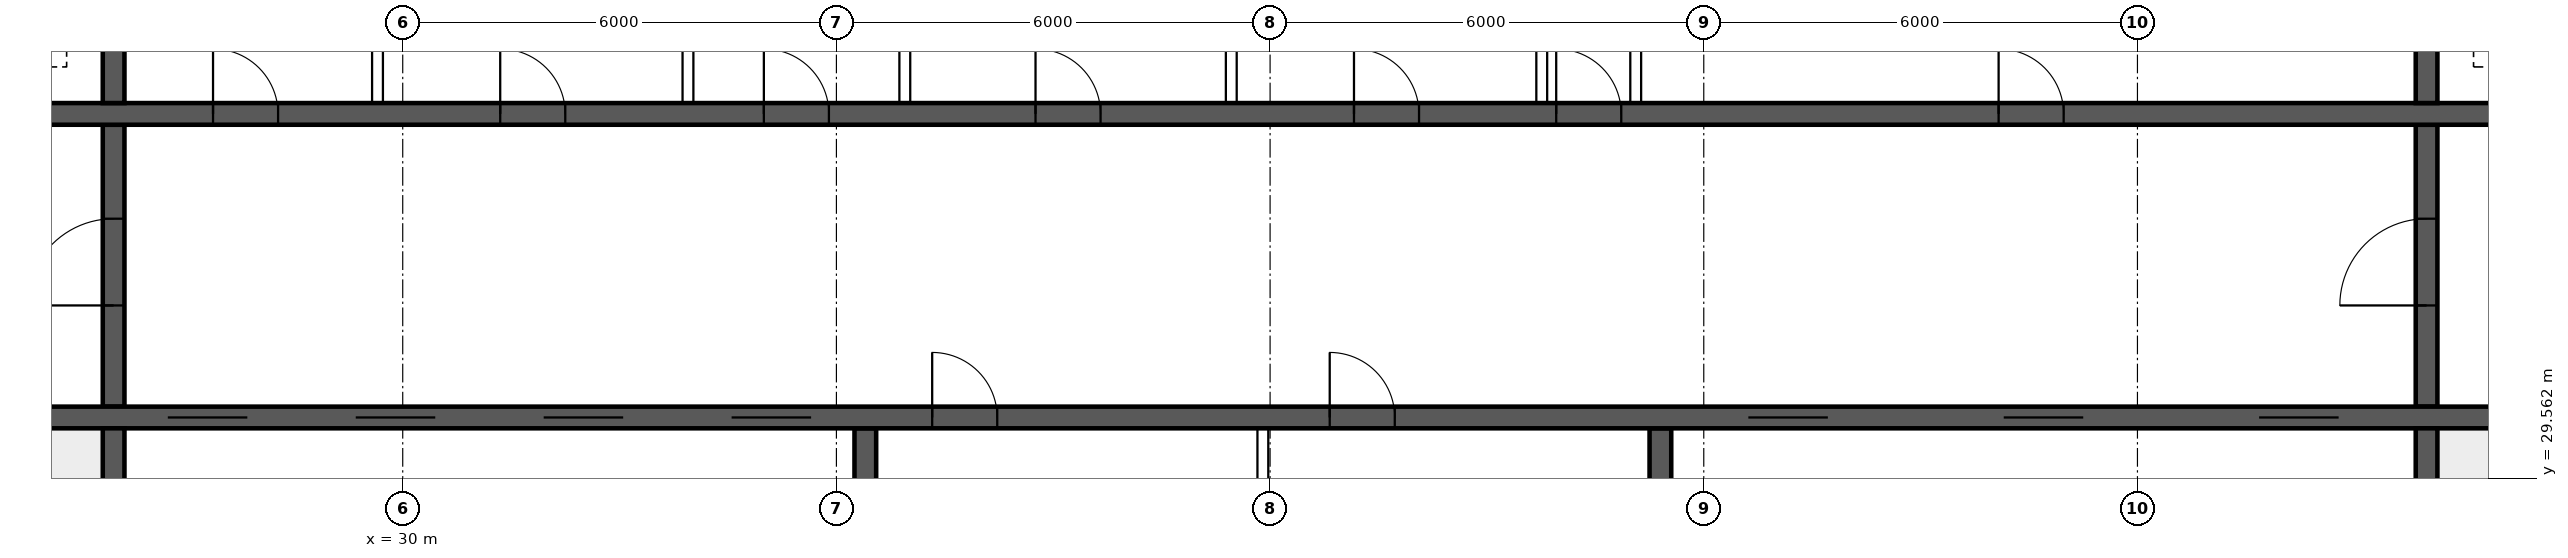
"""IFC4 building model, lengths in metres.
Left out: names, types, materials, properties, quantities, classifications, styles, units other than length and angle.
Written with IfcOpenShell. Run it as: python <this file> out.ifc"""

import sys

from ifc_helpers import new_model, si_unit, direction, frame, frame_2d, origin, place, context, subcontext, project, spatial, rectangle, extrude, element, fill, save


model = new_model("IFC4")
c1 = context("Model", 3, precision=1e-05, world=origin(), true_north=direction((0.0, 1.0)))
c2 = subcontext(c1, "Body", "Model", "MODEL_VIEW")
j1 = project(units=[si_unit("LENGTHUNIT", "METRE"), si_unit("PLANEANGLEUNIT", "RADIAN")], contexts=[c1])
p1 = place(None, origin())
s1 = spatial("IfcSite", under=j1, at=p1, CompositionType="ELEMENT")
p2 = place(p1, origin())
s2 = spatial("IfcBuilding", under=s1, at=p2, CompositionType="ELEMENT")
p3 = place(p2, frame((0.0, 0.0, 231.55)))
s3 = spatial("IfcBuildingStorey", under=s2, at=p3, CompositionType="ELEMENT", Elevation=231.55)
p4 = place(p3, frame((18.35, 30.4, 0.0), z_axis=(0.0, 0.0, 1.0), x_axis=(1.0, 0.0, 0.0)))
e1 = element("IfcWall", 1, at=p4, inside=s3, PredefinedType="SHEAR", context=c2, shape_type="SweptSolid", body=[
    extrude(rectangle(XDim=47.3, YDim=0.3, at=frame_2d((23.65, 0.0))), origin(), (0.0, 0.0, 1.0), 3.75),
])
p5 = place(p4, frame((0.4, 0.0, 0.0)))
e2 = element("IfcOpeningElement", 2, at=p5, cuts=e1, PredefinedType="OPENING", context=c2, shape_type="SweptSolid", body=[
    extrude(rectangle(XDim=1.0, YDim=2.1, at=frame_2d((0.5, 1.05))), frame((0.0, 0.16, 0.0), z_axis=(0.0, -1.0, 0.0), x_axis=(1.0, 0.0, 0.0)), (0.0, 0.0, 1.0), 0.32),
])
p6 = place(p4, frame((45.9, 0.0, 0.0)))
e3 = element("IfcOpeningElement", 3, at=p6, cuts=e1, PredefinedType="OPENING", context=c2, shape_type="SweptSolid", body=[
    extrude(rectangle(XDim=1.0, YDim=2.1, at=frame_2d((0.5, 1.05))), frame((0.0, 0.16, 0.0), z_axis=(0.0, -1.0, 0.0), x_axis=(1.0, 0.0, 0.0)), (0.0, 0.0, 1.0), 0.32),
])
p7 = place(p4, frame((8.4, 0.0, 0.0)))
e4 = element("IfcOpeningElement", 4, at=p7, cuts=e1, PredefinedType="OPENING", context=c2, shape_type="SweptSolid", body=[
    extrude(rectangle(XDim=1.1, YDim=2.1, at=frame_2d((0.55, 1.05))), frame((0.0, 0.16, 0.0), z_axis=(0.0, -1.0, 0.0), x_axis=(1.0, 0.0, 0.0)), (0.0, 0.0, 1.0), 0.32),
])
p8 = place(p4, frame((11.0, 0.0, 0.0)))
e5 = element("IfcOpeningElement", 5, at=p8, cuts=e1, PredefinedType="OPENING", context=c2, shape_type="SweptSolid", body=[
    extrude(rectangle(XDim=1.1, YDim=2.1, at=frame_2d((0.55, 1.05))), frame((0.0, 0.16, 0.0), z_axis=(0.0, -1.0, 0.0), x_axis=(1.0, 0.0, 0.0)), (0.0, 0.0, 1.0), 0.32),
])
p9 = place(p4, frame((13.6, 0.0, 0.0)))
e6 = element("IfcOpeningElement", 6, at=p9, cuts=e1, PredefinedType="OPENING", context=c2, shape_type="SweptSolid", body=[
    extrude(rectangle(XDim=1.1, YDim=2.1, at=frame_2d((0.55, 1.05))), frame((0.0, 0.16, 0.0), z_axis=(0.0, -1.0, 0.0), x_axis=(1.0, 0.0, 0.0)), (0.0, 0.0, 1.0), 0.32),
])
p10 = place(p4, frame((16.2, 0.0, 0.0)))
e7 = element("IfcOpeningElement", 7, at=p10, cuts=e1, PredefinedType="OPENING", context=c2, shape_type="SweptSolid", body=[
    extrude(rectangle(XDim=1.1, YDim=2.1, at=frame_2d((0.55, 1.05))), frame((0.0, 0.16, 0.0), z_axis=(0.0, -1.0, 0.0), x_axis=(1.0, 0.0, 0.0)), (0.0, 0.0, 1.0), 0.32),
])
p11 = place(p4, frame((18.975, 0.0, 0.0)))
e8 = element("IfcOpeningElement", 8, at=p11, cuts=e1, PredefinedType="OPENING", context=c2, shape_type="SweptSolid", body=[
    extrude(rectangle(XDim=0.9, YDim=2.1, at=frame_2d((0.45, 1.05))), frame((0.0, 0.16, 0.0), z_axis=(0.0, -1.0, 0.0), x_axis=(1.0, 0.0, 0.0)), (0.0, 0.0, 1.0), 0.32),
])
p12 = place(p4, frame((24.475, 0.0, 0.0)))
e9 = element("IfcOpeningElement", 9, at=p12, cuts=e1, PredefinedType="OPENING", context=c2, shape_type="SweptSolid", body=[
    extrude(rectangle(XDim=0.9, YDim=2.1, at=frame_2d((0.45, 1.05))), frame((0.0, 0.16, 0.0), z_axis=(0.0, -1.0, 0.0), x_axis=(1.0, 0.0, 0.0)), (0.0, 0.0, 1.0), 0.32),
])
p13 = place(p4, frame((30.267, 0.0, 0.0)))
e10 = element("IfcOpeningElement", 10, at=p13, cuts=e1, PredefinedType="OPENING", context=c2, shape_type="SweptSolid", body=[
    extrude(rectangle(XDim=1.1, YDim=2.1, at=frame_2d((0.55, 1.05))), frame((0.0, 0.16, 0.0), z_axis=(0.0, -1.0, 0.0), x_axis=(1.0, 0.0, 0.0)), (0.0, 0.0, 1.0), 0.32),
])
p14 = place(p4, frame((33.8, 0.0, 0.0)))
e11 = element("IfcOpeningElement", 11, at=p14, cuts=e1, PredefinedType="OPENING", context=c2, shape_type="SweptSolid", body=[
    extrude(rectangle(XDim=1.1, YDim=2.1, at=frame_2d((0.55, 1.05))), frame((0.0, 0.16, 0.0), z_axis=(0.0, -1.0, 0.0), x_axis=(1.0, 0.0, 0.0)), (0.0, 0.0, 1.0), 0.32),
])
p15 = place(p4, frame((37.333, 0.0, 0.0)))
e12 = element("IfcOpeningElement", 12, at=p15, cuts=e1, PredefinedType="OPENING", context=c2, shape_type="SweptSolid", body=[
    extrude(rectangle(XDim=1.1, YDim=2.1, at=frame_2d((0.55, 1.05))), frame((0.0, 0.16, 0.0), z_axis=(0.0, -1.0, 0.0), x_axis=(1.0, 0.0, 0.0)), (0.0, 0.0, 1.0), 0.32),
])
p16 = place(p3, frame((18.35, 34.6, 0.0), z_axis=(0.0, 0.0, 1.0), x_axis=(1.0, 0.0, 0.0)))
e13 = element("IfcWall", 13, at=p16, inside=s3, PredefinedType="SHEAR", context=c2, shape_type="SweptSolid", body=[
    extrude(rectangle(XDim=47.3, YDim=0.3, at=frame_2d((23.65, 0.0))), origin(), (0.0, 0.0, 1.0), 3.75),
])
p17 = place(p16, frame((0.9, 0.0, 0.0)))
e14 = element("IfcOpeningElement", 14, at=p17, cuts=e13, PredefinedType="OPENING", context=c2, shape_type="SweptSolid", body=[
    extrude(rectangle(XDim=1.1, YDim=2.1, at=frame_2d((0.55, 1.05))), frame((0.0, 0.16, 0.0), z_axis=(0.0, -1.0, 0.0), x_axis=(1.0, 0.0, 0.0)), (0.0, 0.0, 1.0), 0.32),
])
p18 = place(p16, frame((45.3, 0.0, 0.0)))
e15 = element("IfcOpeningElement", 15, at=p18, cuts=e13, PredefinedType="OPENING", context=c2, shape_type="SweptSolid", body=[
    extrude(rectangle(XDim=1.1, YDim=2.1, at=frame_2d((0.55, 1.05))), frame((0.0, 0.16, 0.0), z_axis=(0.0, -1.0, 0.0), x_axis=(1.0, 0.0, 0.0)), (0.0, 0.0, 1.0), 0.32),
])
p19 = place(p16, frame((4.25, 0.0, 0.0)))
e16 = element("IfcOpeningElement", 16, at=p19, cuts=e13, PredefinedType="OPENING", context=c2, shape_type="SweptSolid", body=[
    extrude(rectangle(XDim=0.9, YDim=2.1, at=frame_2d((0.45, 1.05))), frame((0.0, 0.16, 0.0), z_axis=(0.0, -1.0, 0.0), x_axis=(1.0, 0.0, 0.0)), (0.0, 0.0, 1.0), 0.32),
])
p20 = place(p16, frame((42.15, 0.0, 0.0)))
e17 = element("IfcOpeningElement", 17, at=p20, cuts=e13, PredefinedType="OPENING", context=c2, shape_type="SweptSolid", body=[
    extrude(rectangle(XDim=0.9, YDim=2.1, at=frame_2d((0.45, 1.05))), frame((0.0, 0.16, 0.0), z_axis=(0.0, -1.0, 0.0), x_axis=(1.0, 0.0, 0.0)), (0.0, 0.0, 1.0), 0.32),
])
p21 = place(p16, frame((9.025, 0.0, 0.0)))
e18 = element("IfcOpeningElement", 18, at=p21, cuts=e13, PredefinedType="OPENING", context=c2, shape_type="SweptSolid", body=[
    extrude(rectangle(XDim=0.9, YDim=2.1, at=frame_2d((0.45, 1.05))), frame((0.0, 0.16, 0.0), z_axis=(0.0, -1.0, 0.0), x_axis=(1.0, 0.0, 0.0)), (0.0, 0.0, 1.0), 0.32),
])
p22 = place(p16, frame((12.999, 0.0, 0.0)))
e19 = element("IfcOpeningElement", 19, at=p22, cuts=e13, PredefinedType="OPENING", context=c2, shape_type="SweptSolid", body=[
    extrude(rectangle(XDim=0.9, YDim=2.1, at=frame_2d((0.45, 1.05))), frame((0.0, 0.16, 0.0), z_axis=(0.0, -1.0, 0.0), x_axis=(1.0, 0.0, 0.0)), (0.0, 0.0, 1.0), 0.32),
])
p23 = place(p16, frame((16.646, 0.0, 0.0)))
e20 = element("IfcOpeningElement", 20, at=p23, cuts=e13, PredefinedType="OPENING", context=c2, shape_type="SweptSolid", body=[
    extrude(rectangle(XDim=0.9, YDim=2.1, at=frame_2d((0.45, 1.05))), frame((0.0, 0.16, 0.0), z_axis=(0.0, -1.0, 0.0), x_axis=(1.0, 0.0, 0.0)), (0.0, 0.0, 1.0), 0.32),
])
p24 = place(p16, frame((20.405, 0.0, 0.0)))
e21 = element("IfcOpeningElement", 21, at=p24, cuts=e13, PredefinedType="OPENING", context=c2, shape_type="SweptSolid", body=[
    extrude(rectangle(XDim=0.9, YDim=2.1, at=frame_2d((0.45, 1.05))), frame((0.0, 0.16, 0.0), z_axis=(0.0, -1.0, 0.0), x_axis=(1.0, 0.0, 0.0)), (0.0, 0.0, 1.0), 0.32),
])
p25 = place(p16, frame((24.811, 0.0, 0.0)))
e22 = element("IfcOpeningElement", 22, at=p25, cuts=e13, PredefinedType="OPENING", context=c2, shape_type="SweptSolid", body=[
    extrude(rectangle(XDim=0.9, YDim=2.1, at=frame_2d((0.45, 1.05))), frame((0.0, 0.16, 0.0), z_axis=(0.0, -1.0, 0.0), x_axis=(1.0, 0.0, 0.0)), (0.0, 0.0, 1.0), 0.32),
])
p26 = place(p16, frame((27.608, 0.0, 0.0)))
e23 = element("IfcOpeningElement", 23, at=p26, cuts=e13, PredefinedType="OPENING", context=c2, shape_type="SweptSolid", body=[
    extrude(rectangle(XDim=0.9, YDim=2.1, at=frame_2d((0.45, 1.05))), frame((0.0, 0.16, 0.0), z_axis=(0.0, -1.0, 0.0), x_axis=(1.0, 0.0, 0.0)), (0.0, 0.0, 1.0), 0.32),
])
p27 = place(p16, frame((33.729, 0.0, 0.0)))
e24 = element("IfcOpeningElement", 24, at=p27, cuts=e13, PredefinedType="OPENING", context=c2, shape_type="SweptSolid", body=[
    extrude(rectangle(XDim=0.9, YDim=2.1, at=frame_2d((0.45, 1.05))), frame((0.0, 0.16, 0.0), z_axis=(0.0, -1.0, 0.0), x_axis=(1.0, 0.0, 0.0)), (0.0, 0.0, 1.0), 0.32),
])
for number, where, z_axis, x_axis in (
    (25, (26.0, 26.15, 0.0), (0.0, 0.0, 1.0), (0.0, 1.0, 0.0)),
    (26, (58.0, 26.15, 0.0), (0.0, 0.0, 1.0), (0.0, 1.0, 0.0)),
):
    element("IfcWall", number, at=place(p3, frame(where, z_axis=z_axis, x_axis=x_axis)), inside=s3, PredefinedType="SHEAR", context=c2, shape_type="SweptSolid", body=[
        extrude(rectangle(XDim=4.1, YDim=0.3, at=frame_2d((2.05, 0.0))), origin(), (0.0, 0.0, 1.0), 3.75),
    ])
p28 = place(p3, frame((26.0, 30.55, 0.0), z_axis=(0.0, 0.0, 1.0), x_axis=(0.0, 1.0, 0.0)))
e27 = element("IfcWall", 27, at=p28, inside=s3, PredefinedType="SHEAR", context=c2, shape_type="SweptSolid", body=[
    extrude(rectangle(XDim=3.9, YDim=0.3, at=frame_2d((1.95, 0.0))), origin(), (0.0, 0.0, 1.0), 3.75),
])
p29 = place(p28, frame((1.4, 0.0, 0.0)))
e28 = element("IfcOpeningElement", 28, at=p29, cuts=e27, PredefinedType="OPENING", context=c2, shape_type="SweptSolid", body=[
    extrude(rectangle(XDim=1.2, YDim=2.1, at=frame_2d((0.6, 1.05))), frame((0.0, 0.16, 0.0), z_axis=(0.0, -1.0, 0.0), x_axis=(1.0, 0.0, 0.0)), (0.0, 0.0, 1.0), 0.32),
])
p30 = place(p3, frame((58.0, 30.55, 0.0), z_axis=(0.0, 0.0, 1.0), x_axis=(0.0, 1.0, 0.0)))
e29 = element("IfcWall", 29, at=p30, inside=s3, PredefinedType="SHEAR", context=c2, shape_type="SweptSolid", body=[
    extrude(rectangle(XDim=3.9, YDim=0.3, at=frame_2d((1.95, 0.0))), origin(), (0.0, 0.0, 1.0), 3.75),
])
p31 = place(p30, frame((1.4, 0.0, 0.0)))
e30 = element("IfcOpeningElement", 30, at=p31, cuts=e29, PredefinedType="OPENING", context=c2, shape_type="SweptSolid", body=[
    extrude(rectangle(XDim=1.2, YDim=2.1, at=frame_2d((0.6, 1.05))), frame((0.0, 0.16, 0.0), z_axis=(0.0, -1.0, 0.0), x_axis=(1.0, 0.0, 0.0)), (0.0, 0.0, 1.0), 0.32),
])
for number, where, z_axis, x_axis in (
    (31, (26.0, 34.75, 0.0), (0.0, 0.0, 1.0), (0.0, 1.0, 0.0)),
    (32, (58.0, 34.75, 0.0), (0.0, 0.0, 1.0), (0.0, 1.0, 0.0)),
):
    element("IfcWall", number, at=place(p3, frame(where, z_axis=z_axis, x_axis=x_axis)), inside=s3, PredefinedType="SHEAR", context=c2, shape_type="SweptSolid", body=[
        extrude(rectangle(XDim=3.1, YDim=0.3, at=frame_2d((1.55, 0.0))), origin(), (0.0, 0.0, 1.0), 3.75),
    ])
for number, where, z_axis, x_axis in (
    (33, (36.4, 26.15, 0.0), (0.0, 0.0, 1.0), (0.0, 1.0, 0.0)),
    (34, (47.4, 26.15, 0.0), (0.0, 0.0, 1.0), (0.0, 1.0, 0.0)),
):
    element("IfcWall", number, at=place(p3, frame(where, z_axis=z_axis, x_axis=x_axis)), inside=s3, PredefinedType="SHEAR", context=c2, shape_type="SweptSolid", body=[
        extrude(rectangle(XDim=4.1, YDim=0.3, at=frame_2d((2.05, 0.0))), origin(), (0.0, 0.0, 1.0), 3.75),
    ])
for number, where, z_axis, x_axis in (
    (35, (29.651, 34.75, 0.0), (0.0, 0.0, 1.0), (0.0, 1.0, 0.0)),
    (36, (33.946, 34.75, 0.0), (0.0, 0.0, 1.0), (0.0, 1.0, 0.0)),
    (37, (36.946, 34.75, 0.0), (0.0, 0.0, 1.0), (0.0, 1.0, 0.0)),
    (38, (41.463, 34.75, 0.0), (0.0, 0.0, 1.0), (0.0, 1.0, 0.0)),
    (39, (45.758, 34.75, 0.0), (0.0, 0.0, 1.0), (0.0, 1.0, 0.0)),
    (40, (47.058, 34.75, 0.0), (0.0, 0.0, 1.0), (0.0, 1.0, 0.0)),
):
    element("IfcWall", number, at=place(p3, frame(where, z_axis=z_axis, x_axis=x_axis)), inside=s3, PredefinedType="SOLIDWALL", context=c2, shape_type="SweptSolid", body=[
        extrude(rectangle(XDim=3.1, YDim=0.15, at=frame_2d((1.55, 0.0))), origin(), (0.0, 0.0, 1.0), 3.5),
    ])
p32 = place(p3, frame((41.9, 26.15, 0.0), z_axis=(0.0, 0.0, 1.0), x_axis=(0.0, 1.0, 0.0)))
e41 = element("IfcWall", 41, at=p32, inside=s3, PredefinedType="SOLIDWALL", context=c2, shape_type="SweptSolid", body=[
    extrude(rectangle(XDim=4.1, YDim=0.15, at=frame_2d((2.05, 0.0))), origin(), (0.0, 0.0, 1.0), 3.5),
])
p33 = place(p29, origin())
e42 = element("IfcDoor", 42, at=p33, inside=s3, OperationType="SINGLE_SWING_LEFT", PredefinedType="DOOR", context=c2, shape_type="SweptSolid", body=[
    extrude(rectangle(XDim=1.2, YDim=2.1, at=frame_2d((0.6, 1.05))), frame((0.0, 0.025, 0.0), z_axis=(0.0, -1.0, 0.0), x_axis=(1.0, 0.0, 0.0)), (0.0, 0.0, 1.0), 0.05),
])
fill(e28, e42)
p34 = place(p31, origin())
e43 = element("IfcDoor", 43, at=p34, inside=s3, OperationType="SINGLE_SWING_LEFT", PredefinedType="DOOR", context=c2, shape_type="SweptSolid", body=[
    extrude(rectangle(XDim=1.2, YDim=2.1, at=frame_2d((0.6, 1.05))), frame((0.0, 0.025, 0.0), z_axis=(0.0, -1.0, 0.0), x_axis=(1.0, 0.0, 0.0)), (0.0, 0.0, 1.0), 0.05),
])
fill(e30, e43)
p35 = place(p21, origin())
e44 = element("IfcDoor", 44, at=p35, inside=s3, OperationType="SINGLE_SWING_LEFT", PredefinedType="DOOR", context=c2, shape_type="SweptSolid", body=[
    extrude(rectangle(XDim=0.9, YDim=2.1, at=frame_2d((0.45, 1.05))), frame((0.0, 0.025, 0.0), z_axis=(0.0, -1.0, 0.0), x_axis=(1.0, 0.0, 0.0)), (0.0, 0.0, 1.0), 0.05),
])
fill(e18, e44)
p36 = place(p22, origin())
e45 = element("IfcDoor", 45, at=p36, inside=s3, OperationType="SINGLE_SWING_LEFT", PredefinedType="DOOR", context=c2, shape_type="SweptSolid", body=[
    extrude(rectangle(XDim=0.9, YDim=2.1, at=frame_2d((0.45, 1.05))), frame((0.0, 0.025, 0.0), z_axis=(0.0, -1.0, 0.0), x_axis=(1.0, 0.0, 0.0)), (0.0, 0.0, 1.0), 0.05),
])
fill(e19, e45)
p37 = place(p23, origin())
e46 = element("IfcDoor", 46, at=p37, inside=s3, OperationType="SINGLE_SWING_LEFT", PredefinedType="DOOR", context=c2, shape_type="SweptSolid", body=[
    extrude(rectangle(XDim=0.9, YDim=2.1, at=frame_2d((0.45, 1.05))), frame((0.0, 0.025, 0.0), z_axis=(0.0, -1.0, 0.0), x_axis=(1.0, 0.0, 0.0)), (0.0, 0.0, 1.0), 0.05),
])
fill(e20, e46)
p38 = place(p24, origin())
e47 = element("IfcDoor", 47, at=p38, inside=s3, OperationType="SINGLE_SWING_LEFT", PredefinedType="DOOR", context=c2, shape_type="SweptSolid", body=[
    extrude(rectangle(XDim=0.9, YDim=2.1, at=frame_2d((0.45, 1.05))), frame((0.0, 0.025, 0.0), z_axis=(0.0, -1.0, 0.0), x_axis=(1.0, 0.0, 0.0)), (0.0, 0.0, 1.0), 0.05),
])
fill(e21, e47)
p39 = place(p25, origin())
e48 = element("IfcDoor", 48, at=p39, inside=s3, OperationType="SINGLE_SWING_LEFT", PredefinedType="DOOR", context=c2, shape_type="SweptSolid", body=[
    extrude(rectangle(XDim=0.9, YDim=2.1, at=frame_2d((0.45, 1.05))), frame((0.0, 0.025, 0.0), z_axis=(0.0, -1.0, 0.0), x_axis=(1.0, 0.0, 0.0)), (0.0, 0.0, 1.0), 0.05),
])
fill(e22, e48)
p40 = place(p26, origin())
e49 = element("IfcDoor", 49, at=p40, inside=s3, OperationType="SINGLE_SWING_LEFT", PredefinedType="DOOR", context=c2, shape_type="SweptSolid", body=[
    extrude(rectangle(XDim=0.9, YDim=2.1, at=frame_2d((0.45, 1.05))), frame((0.0, 0.025, 0.0), z_axis=(0.0, -1.0, 0.0), x_axis=(1.0, 0.0, 0.0)), (0.0, 0.0, 1.0), 0.05),
])
fill(e23, e49)
p41 = place(p27, origin())
e50 = element("IfcDoor", 50, at=p41, inside=s3, OperationType="SINGLE_SWING_LEFT", PredefinedType="DOOR", context=c2, shape_type="SweptSolid", body=[
    extrude(rectangle(XDim=0.9, YDim=2.1, at=frame_2d((0.45, 1.05))), frame((0.0, 0.025, 0.0), z_axis=(0.0, -1.0, 0.0), x_axis=(1.0, 0.0, 0.0)), (0.0, 0.0, 1.0), 0.05),
])
fill(e24, e50)
p42 = place(p7, origin())
e51 = element("IfcDoor", 51, at=p42, inside=s3, OperationType="DOUBLE_DOOR_SLIDING", PredefinedType="DOOR", context=c2, shape_type="SweptSolid", body=[
    extrude(rectangle(XDim=1.1, YDim=2.1, at=frame_2d((0.55, 1.05))), frame((0.0, 0.025, 0.0), z_axis=(0.0, -1.0, 0.0), x_axis=(1.0, 0.0, 0.0)), (0.0, 0.0, 1.0), 0.05),
])
fill(e4, e51)
p43 = place(p8, origin())
e52 = element("IfcDoor", 52, at=p43, inside=s3, OperationType="DOUBLE_DOOR_SLIDING", PredefinedType="DOOR", context=c2, shape_type="SweptSolid", body=[
    extrude(rectangle(XDim=1.1, YDim=2.1, at=frame_2d((0.55, 1.05))), frame((0.0, 0.025, 0.0), z_axis=(0.0, -1.0, 0.0), x_axis=(1.0, 0.0, 0.0)), (0.0, 0.0, 1.0), 0.05),
])
fill(e5, e52)
p44 = place(p9, origin())
e53 = element("IfcDoor", 53, at=p44, inside=s3, OperationType="DOUBLE_DOOR_SLIDING", PredefinedType="DOOR", context=c2, shape_type="SweptSolid", body=[
    extrude(rectangle(XDim=1.1, YDim=2.1, at=frame_2d((0.55, 1.05))), frame((0.0, 0.025, 0.0), z_axis=(0.0, -1.0, 0.0), x_axis=(1.0, 0.0, 0.0)), (0.0, 0.0, 1.0), 0.05),
])
fill(e6, e53)
p45 = place(p10, origin())
e54 = element("IfcDoor", 54, at=p45, inside=s3, OperationType="DOUBLE_DOOR_SLIDING", PredefinedType="DOOR", context=c2, shape_type="SweptSolid", body=[
    extrude(rectangle(XDim=1.1, YDim=2.1, at=frame_2d((0.55, 1.05))), frame((0.0, 0.025, 0.0), z_axis=(0.0, -1.0, 0.0), x_axis=(1.0, 0.0, 0.0)), (0.0, 0.0, 1.0), 0.05),
])
fill(e7, e54)
p46 = place(p11, origin())
e55 = element("IfcDoor", 55, at=p46, inside=s3, OperationType="SINGLE_SWING_LEFT", PredefinedType="DOOR", context=c2, shape_type="SweptSolid", body=[
    extrude(rectangle(XDim=0.9, YDim=2.1, at=frame_2d((0.45, 1.05))), frame((0.0, 0.025, 0.0), z_axis=(0.0, -1.0, 0.0), x_axis=(1.0, 0.0, 0.0)), (0.0, 0.0, 1.0), 0.05),
])
fill(e8, e55)
p47 = place(p12, origin())
e56 = element("IfcDoor", 56, at=p47, inside=s3, OperationType="SINGLE_SWING_LEFT", PredefinedType="DOOR", context=c2, shape_type="SweptSolid", body=[
    extrude(rectangle(XDim=0.9, YDim=2.1, at=frame_2d((0.45, 1.05))), frame((0.0, 0.025, 0.0), z_axis=(0.0, -1.0, 0.0), x_axis=(1.0, 0.0, 0.0)), (0.0, 0.0, 1.0), 0.05),
])
fill(e9, e56)
p48 = place(p13, origin())
e57 = element("IfcDoor", 57, at=p48, inside=s3, OperationType="DOUBLE_DOOR_SLIDING", PredefinedType="DOOR", context=c2, shape_type="SweptSolid", body=[
    extrude(rectangle(XDim=1.1, YDim=2.1, at=frame_2d((0.55, 1.05))), frame((0.0, 0.025, 0.0), z_axis=(0.0, -1.0, 0.0), x_axis=(1.0, 0.0, 0.0)), (0.0, 0.0, 1.0), 0.05),
])
fill(e10, e57)
p49 = place(p14, origin())
e58 = element("IfcDoor", 58, at=p49, inside=s3, OperationType="DOUBLE_DOOR_SLIDING", PredefinedType="DOOR", context=c2, shape_type="SweptSolid", body=[
    extrude(rectangle(XDim=1.1, YDim=2.1, at=frame_2d((0.55, 1.05))), frame((0.0, 0.025, 0.0), z_axis=(0.0, -1.0, 0.0), x_axis=(1.0, 0.0, 0.0)), (0.0, 0.0, 1.0), 0.05),
])
fill(e11, e58)
p50 = place(p15, origin())
e59 = element("IfcDoor", 59, at=p50, inside=s3, OperationType="DOUBLE_DOOR_SLIDING", PredefinedType="DOOR", context=c2, shape_type="SweptSolid", body=[
    extrude(rectangle(XDim=1.1, YDim=2.1, at=frame_2d((0.55, 1.05))), frame((0.0, 0.025, 0.0), z_axis=(0.0, -1.0, 0.0), x_axis=(1.0, 0.0, 0.0)), (0.0, 0.0, 1.0), 0.05),
])
fill(e12, e59)
save(model, sys.argv[1])
